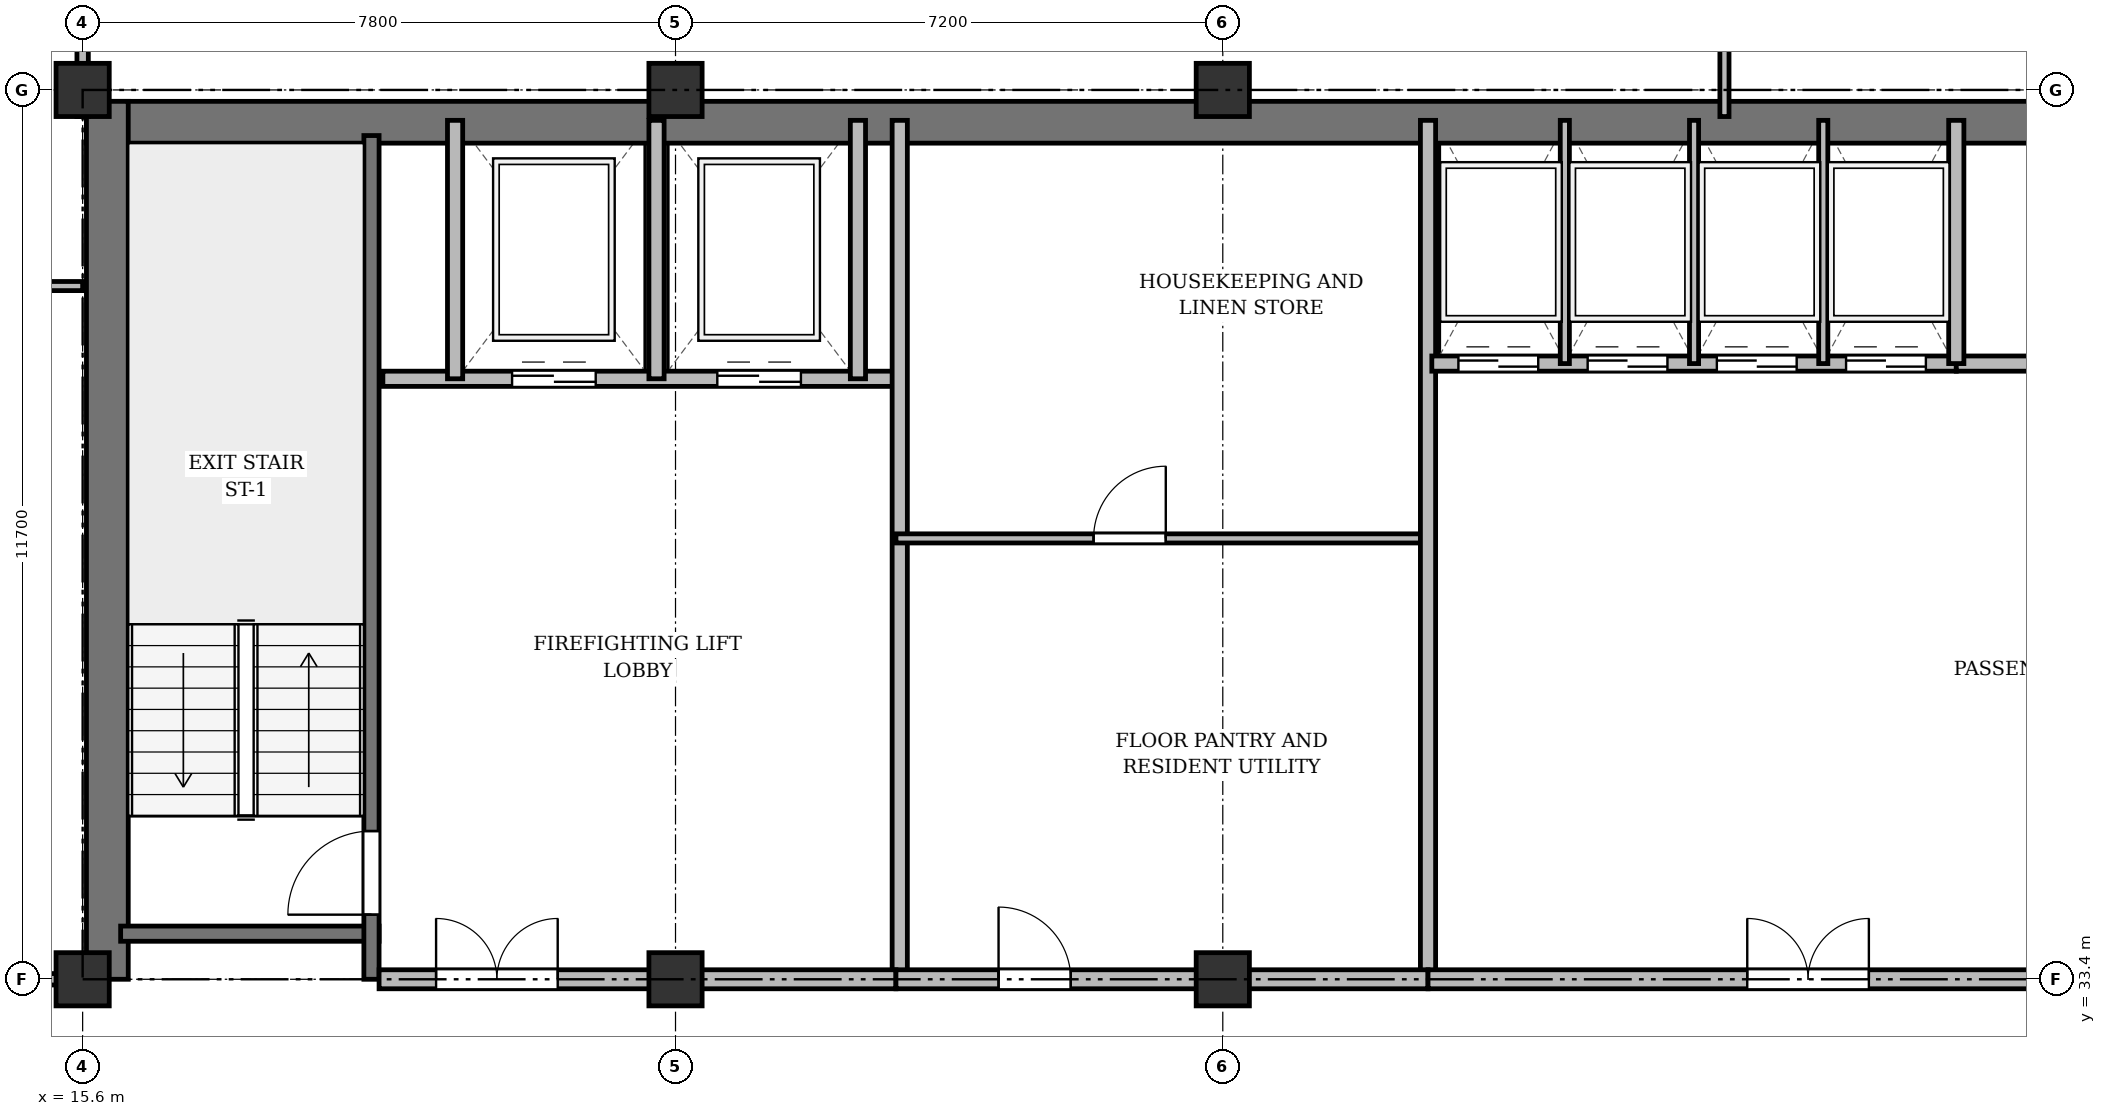
"""IFC4 building model, lengths in metres.
Left out: names, types, materials, properties, quantities, classifications, styles, units other than length and angle.
Written with IfcOpenShell. Run it as: python <this file> out.ifc"""

import sys

from ifc_helpers import new_model, si_unit, direction, frame, frame_2d, origin, origin_2d, place, context, subcontext, project, spatial, rectangle, extrude, source, transform, mapped, element, fill, save


model = new_model("IFC4")
c1 = context("Model", 3, precision=1e-05, world=origin(), true_north=direction((0.0, 1.0)))
c2 = subcontext(c1, "Body", "Model", "MODEL_VIEW")
j1 = project(units=[si_unit("LENGTHUNIT", "METRE"), si_unit("PLANEANGLEUNIT", "RADIAN")], contexts=[c1])
p1 = place(None, origin())
s1 = spatial("IfcSite", under=j1, at=p1, CompositionType="ELEMENT")
p2 = place(p1, origin())
s2 = spatial("IfcBuilding", under=s1, at=p2, CompositionType="ELEMENT")
p3 = place(p2, frame((0.0, 0.0, 194.1)))
s3 = spatial("IfcBuildingStorey", under=s2, at=p3, CompositionType="ELEMENT", Elevation=194.1)
m1 = source(origin(), c2, "Body", "SweptSolid", [
    extrude(rectangle(XDim=0.7, YDim=0.7, at=origin_2d()), origin(), (0.0, 0.0, 1.0), 3.6),
])
for number, where, z_axis, x_axis in (
    (1, (15.6, 33.4, 0.0), (0.0, 0.0, 1.0), (1.0, 0.0, 0.0)),
    (2, (15.6, 45.1, 0.0), (0.0, 0.0, 1.0), (1.0, 0.0, 0.0)),
    (3, (23.4, 33.4, 0.0), (0.0, 0.0, 1.0), (1.0, 0.0, 0.0)),
    (4, (23.4, 45.1, 0.0), (0.0, 0.0, 1.0), (1.0, 0.0, 0.0)),
    (5, (30.6, 33.4, 0.0), (0.0, 0.0, 1.0), (1.0, 0.0, 0.0)),
    (6, (30.6, 45.1, 0.0), (0.0, 0.0, 1.0), (1.0, 0.0, 0.0)),
):
    element("IfcColumn", number, at=place(p3, frame(where, z_axis=z_axis, x_axis=x_axis)), inside=s3, PredefinedType="COLUMN", context=c2, shape_type="MappedRepresentation", body=[
        mapped(m1, transform((0.0, 0.0, 0.0), x_axis=(1.0, 0.0, 0.0), y_axis=(0.0, 1.0, 0.0), z_axis=(0.0, 0.0, 1.0), scale=1.0)),
    ])
p4 = place(p3, frame((15.65, 44.675, 0.0), z_axis=(0.0, 0.0, 1.0), x_axis=(1.0, 0.0, 0.0)))
e7 = element("IfcWall", 7, at=p4, inside=s3, PredefinedType="SHEAR", context=c2, shape_type="SweptSolid", body=[
    extrude(rectangle(XDim=43.1, YDim=0.55, at=frame_2d((21.55, 0.0))), origin(), (0.0, 0.0, 1.0), 3.36),
])
p5 = place(p3, frame((15.925, 33.4, 0.0), z_axis=(0.0, 0.0, 1.0), x_axis=(0.0, 1.0, 0.0)))
e8 = element("IfcWall", 8, at=p5, inside=s3, PredefinedType="SHEAR", context=c2, shape_type="SweptSolid", body=[
    extrude(rectangle(XDim=11.55, YDim=0.55, at=frame_2d((5.775, 0.0))), origin(), (0.0, 0.0, 1.0), 3.36),
])
p6 = place(p3, frame((16.1, 34.0, 0.0), z_axis=(0.0, 0.0, 1.0), x_axis=(1.0, 0.0, 0.0)))
e9 = element("IfcWall", 9, at=p6, inside=s3, PredefinedType="SHEAR", context=c2, shape_type="SweptSolid", body=[
    extrude(rectangle(XDim=3.4, YDim=0.2, at=frame_2d((1.7, 0.0))), origin(), (0.0, 0.0, 1.0), 3.36),
])
p7 = place(p3, frame((19.4, 33.4, 0.0), z_axis=(0.0, 0.0, 1.0), x_axis=(0.0, 1.0, 0.0)))
e10 = element("IfcWall", 10, at=p7, inside=s3, PredefinedType="SHEAR", context=c2, shape_type="SweptSolid", body=[
    extrude(rectangle(XDim=11.1, YDim=0.2, at=frame_2d((5.55, 0.0))), origin(), (0.0, 0.0, 1.0), 3.36),
])
p8 = place(p7, frame((0.85, 0.0, 0.0)))
e11 = element("IfcOpeningElement", 11, at=p8, cuts=e10, PredefinedType="OPENING", context=c2, shape_type="SweptSolid", body=[
    extrude(rectangle(XDim=1.1, YDim=2.15, at=frame_2d((0.55, 1.075))), frame((0.0, 0.11, 0.0), z_axis=(0.0, -1.0, 0.0), x_axis=(1.0, 0.0, 0.0)), (0.0, 0.0, 1.0), 0.22),
])
p9 = place(p3, frame((19.55, 41.3, 0.0), z_axis=(0.0, 0.0, 1.0), x_axis=(1.0, 0.0, 0.0)))
e12 = element("IfcWall", 12, at=p9, inside=s3, PredefinedType="SOLIDWALL", context=c2, shape_type="SweptSolid", body=[
    extrude(rectangle(XDim=6.75, YDim=0.2, at=frame_2d((3.375, 0.0))), origin(), (0.0, 0.0, 1.0), 3.36),
])
p10 = place(p9, frame((1.7, 0.0, 0.0)))
e13 = element("IfcOpeningElement", 13, at=p10, cuts=e12, PredefinedType="OPENING", context=c2, shape_type="SweptSolid", body=[
    extrude(rectangle(XDim=1.1, YDim=2.15, at=frame_2d((0.55, 1.075))), frame((0.0, 0.11, 0.0), z_axis=(0.0, -1.0, 0.0), x_axis=(1.0, 0.0, 0.0)), (0.0, 0.0, 1.0), 0.22),
])
p11 = place(p9, frame((4.4, 0.0, 0.0)))
e14 = element("IfcOpeningElement", 14, at=p11, cuts=e12, PredefinedType="OPENING", context=c2, shape_type="SweptSolid", body=[
    extrude(rectangle(XDim=1.1, YDim=2.15, at=frame_2d((0.55, 1.075))), frame((0.0, 0.11, 0.0), z_axis=(0.0, -1.0, 0.0), x_axis=(1.0, 0.0, 0.0)), (0.0, 0.0, 1.0), 0.22),
])
for number, where, z_axis, x_axis in (
    (15, (20.5, 41.3, 0.0), (0.0, 0.0, 1.0), (0.0, 1.0, 0.0)),
    (16, (23.15, 41.3, 0.0), (0.0, 0.0, 1.0), (0.0, 1.0, 0.0)),
    (17, (25.8, 41.3, 0.0), (0.0, 0.0, 1.0), (0.0, 1.0, 0.0)),
):
    element("IfcWall", number, at=place(p3, frame(where, z_axis=z_axis, x_axis=x_axis)), inside=s3, PredefinedType="SOLIDWALL", context=c2, shape_type="SweptSolid", body=[
        extrude(rectangle(XDim=3.4, YDim=0.2, at=frame_2d((1.7, 0.0))), origin(), (0.0, 0.0, 1.0), 3.36),
    ])
p12 = place(p3, frame((26.35, 33.4, 0.0), z_axis=(0.0, 0.0, 1.0), x_axis=(0.0, 1.0, 0.0)))
e18 = element("IfcWall", 18, at=p12, inside=s3, PredefinedType="SOLIDWALL", context=c2, shape_type="SweptSolid", body=[
    extrude(rectangle(XDim=11.3, YDim=0.2, at=frame_2d((5.65, 0.0))), origin(), (0.0, 0.0, 1.0), 2.91),
])
p13 = place(p3, frame((19.5, 33.4, 0.0), z_axis=(0.0, 0.0, 1.0), x_axis=(1.0, 0.0, 0.0)))
e19 = element("IfcWall", 19, at=p13, inside=s3, PredefinedType="PARTITIONING", context=c2, shape_type="SweptSolid", body=[
    extrude(rectangle(XDim=6.8, YDim=0.25, at=frame_2d((3.4, 0.0))), origin(), (0.0, 0.0, 1.0), 2.91),
])
p14 = place(p13, frame((0.75, 0.0, 0.0)))
e20 = element("IfcOpeningElement", 20, at=p14, cuts=e19, PredefinedType="OPENING", context=c2, shape_type="SweptSolid", body=[
    extrude(rectangle(XDim=1.6, YDim=2.2, at=frame_2d((0.8, 1.1))), frame((0.0, 0.135, 0.0), z_axis=(0.0, -1.0, 0.0), x_axis=(1.0, 0.0, 0.0)), (0.0, 0.0, 1.0), 0.27),
])
p15 = place(p3, frame((26.3, 39.2, 0.0), z_axis=(0.0, 0.0, 1.0), x_axis=(1.0, 0.0, 0.0)))
e21 = element("IfcWall", 21, at=p15, inside=s3, PredefinedType="PARTITIONING", context=c2, shape_type="SweptSolid", body=[
    extrude(rectangle(XDim=7.0, YDim=0.12, at=frame_2d((3.5, 0.0))), origin(), (0.0, 0.0, 1.0), 2.86),
])
p16 = place(p15, frame((2.6, 0.0, 0.0)))
e22 = element("IfcOpeningElement", 22, at=p16, cuts=e21, PredefinedType="OPENING", context=c2, shape_type="SweptSolid", body=[
    extrude(rectangle(XDim=0.95, YDim=2.15, at=frame_2d((0.475, 1.075))), frame((0.0, 0.07, 0.0), z_axis=(0.0, -1.0, 0.0), x_axis=(1.0, 0.0, 0.0)), (0.0, 0.0, 1.0), 0.14),
])
p17 = place(p3, frame((33.3, 33.4, 0.0), z_axis=(0.0, 0.0, 1.0), x_axis=(0.0, 1.0, 0.0)))
e23 = element("IfcWall", 23, at=p17, inside=s3, PredefinedType="SOLIDWALL", context=c2, shape_type="SweptSolid", body=[
    extrude(rectangle(XDim=11.3, YDim=0.2, at=frame_2d((5.65, 0.0))), origin(), (0.0, 0.0, 1.0), 2.91),
])
p18 = place(p3, frame((33.35, 41.5, 0.0), z_axis=(0.0, 0.0, 1.0), x_axis=(1.0, 0.0, 0.0)))
e24 = element("IfcWall", 24, at=p18, inside=s3, PredefinedType="SOLIDWALL", context=c2, shape_type="SweptSolid", body=[
    extrude(rectangle(XDim=6.9, YDim=0.2, at=frame_2d((3.45, 0.0))), origin(), (0.0, 0.0, 1.0), 3.36),
])
p19 = place(p18, frame((0.35, 0.0, 0.0)))
e25 = element("IfcOpeningElement", 25, at=p19, cuts=e24, PredefinedType="OPENING", context=c2, shape_type="SweptSolid", body=[
    extrude(rectangle(XDim=1.05, YDim=2.15, at=frame_2d((0.525, 1.075))), frame((0.0, 0.11, 0.0), z_axis=(0.0, -1.0, 0.0), x_axis=(1.0, 0.0, 0.0)), (0.0, 0.0, 1.0), 0.22),
])
p20 = place(p18, frame((2.05, 0.0, 0.0)))
e26 = element("IfcOpeningElement", 26, at=p20, cuts=e24, PredefinedType="OPENING", context=c2, shape_type="SweptSolid", body=[
    extrude(rectangle(XDim=1.05, YDim=2.15, at=frame_2d((0.525, 1.075))), frame((0.0, 0.11, 0.0), z_axis=(0.0, -1.0, 0.0), x_axis=(1.0, 0.0, 0.0)), (0.0, 0.0, 1.0), 0.22),
])
p21 = place(p18, frame((3.75, 0.0, 0.0)))
e27 = element("IfcOpeningElement", 27, at=p21, cuts=e24, PredefinedType="OPENING", context=c2, shape_type="SweptSolid", body=[
    extrude(rectangle(XDim=1.05, YDim=2.15, at=frame_2d((0.525, 1.075))), frame((0.0, 0.11, 0.0), z_axis=(0.0, -1.0, 0.0), x_axis=(1.0, 0.0, 0.0)), (0.0, 0.0, 1.0), 0.22),
])
p22 = place(p18, frame((5.45, 0.0, 0.0)))
e28 = element("IfcOpeningElement", 28, at=p22, cuts=e24, PredefinedType="OPENING", context=c2, shape_type="SweptSolid", body=[
    extrude(rectangle(XDim=1.05, YDim=2.15, at=frame_2d((0.525, 1.075))), frame((0.0, 0.11, 0.0), z_axis=(0.0, -1.0, 0.0), x_axis=(1.0, 0.0, 0.0)), (0.0, 0.0, 1.0), 0.22),
])
for number, where, z_axis, x_axis in (
    (29, (35.1, 41.5, 0.0), (0.0, 0.0, 1.0), (0.0, 1.0, 0.0)),
    (30, (36.8, 41.5, 0.0), (0.0, 0.0, 1.0), (0.0, 1.0, 0.0)),
    (31, (38.5, 41.5, 0.0), (0.0, 0.0, 1.0), (0.0, 1.0, 0.0)),
):
    element("IfcWall", number, at=place(p3, frame(where, z_axis=z_axis, x_axis=x_axis)), inside=s3, PredefinedType="PARTITIONING", context=c2, shape_type="SweptSolid", body=[
        extrude(rectangle(XDim=3.2, YDim=0.12, at=frame_2d((1.6, 0.0))), origin(), (0.0, 0.0, 1.0), 3.36),
    ])
p23 = place(p3, frame((40.25, 41.5, 0.0), z_axis=(0.0, 0.0, 1.0), x_axis=(1.0, 0.0, 0.0)))
e32 = element("IfcWall", 32, at=p23, inside=s3, PredefinedType="SOLIDWALL", context=c2, shape_type="SweptSolid", body=[
    extrude(rectangle(XDim=6.9, YDim=0.2, at=frame_2d((3.45, 0.0))), origin(), (0.0, 0.0, 1.0), 2.86),
])
p24 = place(p3, frame((40.25, 41.5, 0.0), z_axis=(0.0, 0.0, 1.0), x_axis=(0.0, 1.0, 0.0)))
e33 = element("IfcWall", 33, at=p24, inside=s3, PredefinedType="SOLIDWALL", context=c2, shape_type="SweptSolid", body=[
    extrude(rectangle(XDim=3.2, YDim=0.2, at=frame_2d((1.6, 0.0))), origin(), (0.0, 0.0, 1.0), 3.36),
])
p25 = place(p3, frame((26.3, 33.4, 0.0), z_axis=(0.0, 0.0, 1.0), x_axis=(1.0, 0.0, 0.0)))
e34 = element("IfcWall", 34, at=p25, inside=s3, PredefinedType="PARTITIONING", context=c2, shape_type="SweptSolid", body=[
    extrude(rectangle(XDim=7.0, YDim=0.25, at=frame_2d((3.5, 0.0))), origin(), (0.0, 0.0, 1.0), 2.91),
])
p26 = place(p25, frame((1.35, 0.0, 0.0)))
e35 = element("IfcOpeningElement", 35, at=p26, cuts=e34, PredefinedType="OPENING", context=c2, shape_type="SweptSolid", body=[
    extrude(rectangle(XDim=0.95, YDim=2.15, at=frame_2d((0.475, 1.075))), frame((0.0, 0.135, 0.0), z_axis=(0.0, -1.0, 0.0), x_axis=(1.0, 0.0, 0.0)), (0.0, 0.0, 1.0), 0.27),
])
p27 = place(p3, frame((33.3, 33.4, 0.0), z_axis=(0.0, 0.0, 1.0), x_axis=(1.0, 0.0, 0.0)))
e36 = element("IfcWall", 36, at=p27, inside=s3, PredefinedType="PARTITIONING", context=c2, shape_type="SweptSolid", body=[
    extrude(rectangle(XDim=13.85, YDim=0.25, at=frame_2d((6.925, 0.0))), origin(), (0.0, 0.0, 1.0), 2.91),
])
p28 = place(p27, frame((4.2, 0.0, 0.0)))
e37 = element("IfcOpeningElement", 37, at=p28, cuts=e36, PredefinedType="OPENING", context=c2, shape_type="SweptSolid", body=[
    extrude(rectangle(XDim=1.6, YDim=2.2, at=frame_2d((0.8, 1.1))), frame((0.0, 0.135, 0.0), z_axis=(0.0, -1.0, 0.0), x_axis=(1.0, 0.0, 0.0)), (0.0, 0.0, 1.0), 0.27),
])
p29 = place(p3, frame((11.925, 42.52, 0.0), z_axis=(0.0, 0.0, 1.0), x_axis=(1.0, 0.0, 0.0)))
e38 = element("IfcWall", 38, at=p29, inside=s3, PredefinedType="PARTITIONING", context=c2, shape_type="SweptSolid", body=[
    extrude(rectangle(XDim=3.675, YDim=0.12, at=frame_2d((1.837, 0.0))), origin(), (0.0, 0.0, 1.0), 2.86),
])
p30 = place(p29, frame((1.362, 0.0, 0.0)))
e39 = element("IfcOpeningElement", 39, at=p30, cuts=e38, PredefinedType="OPENING", context=c2, shape_type="SweptSolid", body=[
    extrude(rectangle(XDim=0.95, YDim=2.15, at=frame_2d((0.475, 1.075))), frame((0.0, 0.07, 0.0), z_axis=(0.0, -1.0, 0.0), x_axis=(1.0, 0.0, 0.0)), (0.0, 0.0, 1.0), 0.14),
])
p31 = place(p3, frame((8.25, 33.4, 0.0), z_axis=(0.0, 0.0, 1.0), x_axis=(1.0, 0.0, 0.0)))
e40 = element("IfcWall", 40, at=p31, inside=s3, PredefinedType="PARTITIONING", context=c2, shape_type="SweptSolid", body=[
    extrude(rectangle(XDim=7.35, YDim=0.15, at=frame_2d((3.675, 0.0))), origin(), (0.0, 0.0, 1.0), 2.91),
])
p32 = place(p31, frame((4.275, 0.0, 0.0)))
e41 = element("IfcOpeningElement", 41, at=p32, cuts=e40, PredefinedType="OPENING", context=c2, shape_type="SweptSolid", body=[
    extrude(rectangle(XDim=0.95, YDim=2.15, at=frame_2d((0.475, 1.075))), frame((0.0, 0.085, 0.0), z_axis=(0.0, -1.0, 0.0), x_axis=(1.0, 0.0, 0.0)), (0.0, 0.0, 1.0), 0.17),
])
p33 = place(p3, frame((37.2, 44.75, 0.0), z_axis=(0.0, 0.0, 1.0), x_axis=(0.0, 1.0, 0.0)))
e42 = element("IfcWall", 42, at=p33, inside=s3, PredefinedType="PARTITIONING", context=c2, shape_type="SweptSolid", body=[
    extrude(rectangle(XDim=3.61, YDim=0.12, at=frame_2d((1.805, 0.0))), origin(), (0.0, 0.0, 1.0), 2.91),
])
p34 = place(p33, frame((1.1, 0.0, 0.0)))
e43 = element("IfcOpeningElement", 43, at=p34, cuts=e42, PredefinedType="OPENING", context=c2, shape_type="SweptSolid", body=[
    extrude(rectangle(XDim=0.95, YDim=2.15, at=frame_2d((0.475, 1.075))), frame((0.0, 0.07, 0.0), z_axis=(0.0, -1.0, 0.0), x_axis=(1.0, 0.0, 0.0)), (0.0, 0.0, 1.0), 0.14),
])
p35 = place(p3, frame((15.6, 44.75, 0.0), z_axis=(0.0, 0.0, 1.0), x_axis=(0.0, 1.0, 0.0)))
e44 = element("IfcWall", 44, at=p35, inside=s3, PredefinedType="PARTITIONING", context=c2, shape_type="SweptSolid", body=[
    extrude(rectangle(XDim=3.61, YDim=0.15, at=frame_2d((1.805, 0.0))), origin(), (0.0, 0.0, 1.0), 2.86),
])
p36 = place(p35, frame((1.1, 0.0, 0.0)))
e45 = element("IfcOpeningElement", 45, at=p36, cuts=e44, PredefinedType="OPENING", context=c2, shape_type="SweptSolid", body=[
    extrude(rectangle(XDim=0.95, YDim=2.15, at=frame_2d((0.475, 1.075))), frame((0.0, 0.085, 0.0), z_axis=(0.0, -1.0, 0.0), x_axis=(1.0, 0.0, 0.0)), (0.0, 0.0, 1.0), 0.17),
])
m2 = source(origin(), c2, "Body", "SweptSolid", [
    extrude(rectangle(XDim=1.1, YDim=2.15, at=frame_2d((0.55, 1.075))), frame((0.0, 0.025, 0.0), z_axis=(0.0, -1.0, 0.0), x_axis=(1.0, 0.0, 0.0)), (0.0, 0.0, 1.0), 0.05),
])
p37 = place(p8, origin())
e46 = element("IfcDoor", 46, at=p37, inside=s3, OperationType="SINGLE_SWING_LEFT", PredefinedType="DOOR", context=c2, shape_type="MappedRepresentation", body=[
    mapped(m2, transform((0.0, 0.0, 0.0), x_axis=(1.0, 0.0, 0.0), y_axis=(0.0, 1.0, 0.0), z_axis=(0.0, 0.0, 1.0), scale=1.0)),
])
fill(e11, e46)
p38 = place(p10, origin())
e47 = element("IfcDoor", 47, at=p38, inside=s3, OperationType="DOUBLE_DOOR_SLIDING", PredefinedType="DOOR", context=c2, shape_type="MappedRepresentation", body=[
    mapped(m2, transform((0.0, 0.0, 0.0), x_axis=(1.0, 0.0, 0.0), y_axis=(0.0, 1.0, 0.0), z_axis=(0.0, 0.0, 1.0), scale=1.0)),
])
fill(e13, e47)
p39 = place(p11, origin())
e48 = element("IfcDoor", 48, at=p39, inside=s3, OperationType="DOUBLE_DOOR_SLIDING", PredefinedType="DOOR", context=c2, shape_type="MappedRepresentation", body=[
    mapped(m2, transform((0.0, 0.0, 0.0), x_axis=(1.0, 0.0, 0.0), y_axis=(0.0, 1.0, 0.0), z_axis=(0.0, 0.0, 1.0), scale=1.0)),
])
fill(e14, e48)
m3 = source(origin(), c2, "Body", "SweptSolid", [
    extrude(rectangle(XDim=1.6, YDim=2.2, at=frame_2d((0.8, 1.1))), frame((0.0, 0.025, 0.0), z_axis=(0.0, -1.0, 0.0), x_axis=(1.0, 0.0, 0.0)), (0.0, 0.0, 1.0), 0.05),
])
p40 = place(p14, origin())
e49 = element("IfcDoor", 49, at=p40, inside=s3, OperationType="DOUBLE_DOOR_SINGLE_SWING", PredefinedType="DOOR", context=c2, shape_type="MappedRepresentation", body=[
    mapped(m3, transform((0.0, 0.0, 0.0), x_axis=(1.0, 0.0, 0.0), y_axis=(0.0, 1.0, 0.0), z_axis=(0.0, 0.0, 1.0), scale=1.0)),
])
fill(e20, e49)
m4 = source(origin(), c2, "Body", "SweptSolid", [
    extrude(rectangle(XDim=0.95, YDim=2.15, at=frame_2d((0.475, 1.075))), frame((0.0, 0.025, 0.0), z_axis=(0.0, -1.0, 0.0), x_axis=(1.0, 0.0, 0.0)), (0.0, 0.0, 1.0), 0.05),
])
p41 = place(p16, origin())
e50 = element("IfcDoor", 50, at=p41, inside=s3, OperationType="SINGLE_SWING_RIGHT", PredefinedType="DOOR", context=c2, shape_type="MappedRepresentation", body=[
    mapped(m4, transform((0.0, 0.0, 0.0), x_axis=(1.0, 0.0, 0.0), y_axis=(0.0, 1.0, 0.0), z_axis=(0.0, 0.0, 1.0), scale=1.0)),
])
fill(e22, e50)
m5 = source(origin(), c2, "Body", "SweptSolid", [
    extrude(rectangle(XDim=1.05, YDim=2.15, at=frame_2d((0.525, 1.075))), frame((0.0, 0.025, 0.0), z_axis=(0.0, -1.0, 0.0), x_axis=(1.0, 0.0, 0.0)), (0.0, 0.0, 1.0), 0.05),
])
p42 = place(p19, origin())
e51 = element("IfcDoor", 51, at=p42, inside=s3, OperationType="DOUBLE_DOOR_SLIDING", PredefinedType="DOOR", context=c2, shape_type="MappedRepresentation", body=[
    mapped(m5, transform((0.0, 0.0, 0.0), x_axis=(1.0, 0.0, 0.0), y_axis=(0.0, 1.0, 0.0), z_axis=(0.0, 0.0, 1.0), scale=1.0)),
])
fill(e25, e51)
p43 = place(p20, origin())
e52 = element("IfcDoor", 52, at=p43, inside=s3, OperationType="DOUBLE_DOOR_SLIDING", PredefinedType="DOOR", context=c2, shape_type="MappedRepresentation", body=[
    mapped(m5, transform((0.0, 0.0, 0.0), x_axis=(1.0, 0.0, 0.0), y_axis=(0.0, 1.0, 0.0), z_axis=(0.0, 0.0, 1.0), scale=1.0)),
])
fill(e26, e52)
p44 = place(p21, origin())
e53 = element("IfcDoor", 53, at=p44, inside=s3, OperationType="DOUBLE_DOOR_SLIDING", PredefinedType="DOOR", context=c2, shape_type="MappedRepresentation", body=[
    mapped(m5, transform((0.0, 0.0, 0.0), x_axis=(1.0, 0.0, 0.0), y_axis=(0.0, 1.0, 0.0), z_axis=(0.0, 0.0, 1.0), scale=1.0)),
])
fill(e27, e53)
p45 = place(p22, origin())
e54 = element("IfcDoor", 54, at=p45, inside=s3, OperationType="DOUBLE_DOOR_SLIDING", PredefinedType="DOOR", context=c2, shape_type="MappedRepresentation", body=[
    mapped(m5, transform((0.0, 0.0, 0.0), x_axis=(1.0, 0.0, 0.0), y_axis=(0.0, 1.0, 0.0), z_axis=(0.0, 0.0, 1.0), scale=1.0)),
])
fill(e28, e54)
p46 = place(p26, origin())
e55 = element("IfcDoor", 55, at=p46, inside=s3, OperationType="SINGLE_SWING_LEFT", PredefinedType="DOOR", context=c2, shape_type="MappedRepresentation", body=[
    mapped(m4, transform((0.0, 0.0, 0.0), x_axis=(1.0, 0.0, 0.0), y_axis=(0.0, 1.0, 0.0), z_axis=(0.0, 0.0, 1.0), scale=1.0)),
])
fill(e35, e55)
p47 = place(p28, origin())
e56 = element("IfcDoor", 56, at=p47, inside=s3, OperationType="DOUBLE_DOOR_SINGLE_SWING", PredefinedType="DOOR", context=c2, shape_type="MappedRepresentation", body=[
    mapped(m3, transform((0.0, 0.0, 0.0), x_axis=(1.0, 0.0, 0.0), y_axis=(0.0, 1.0, 0.0), z_axis=(0.0, 0.0, 1.0), scale=1.0)),
])
fill(e37, e56)
save(model, sys.argv[1])
